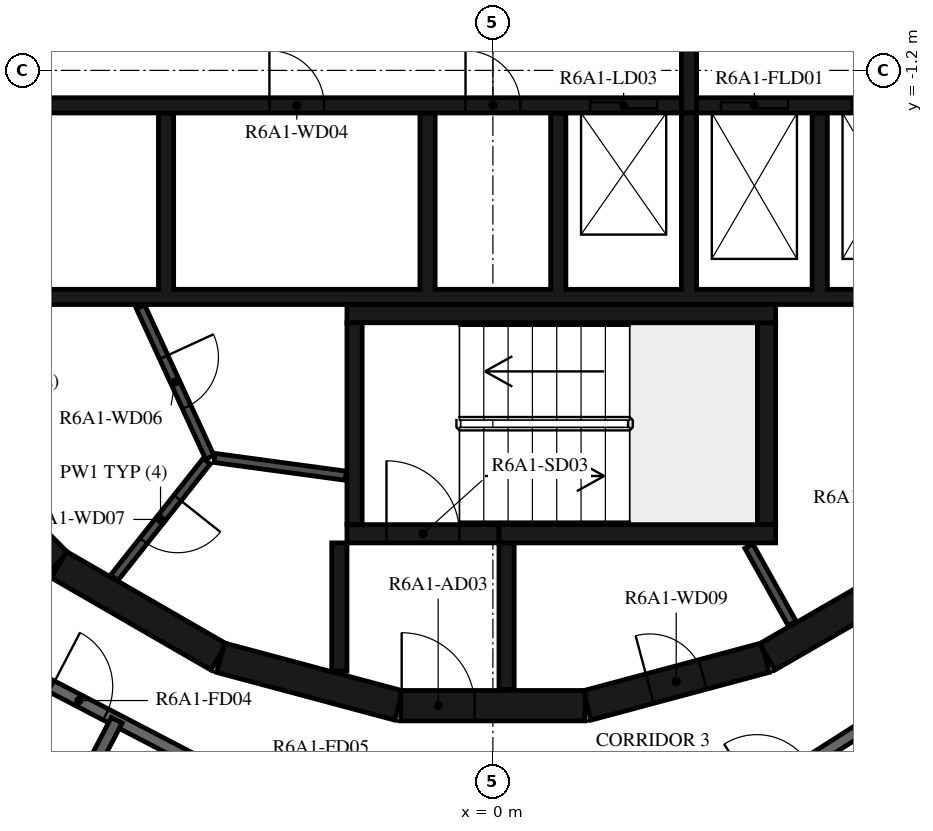
"""IFC4 building model, lengths in metres.
Left out: names, types, materials, properties, quantities, classifications, styles, units other than length and angle.
Written with IfcOpenShell. Run it as: python <this file> out.ifc"""

import sys

from ifc_helpers import new_model, si_unit, direction, frame, frame_2d, origin, place, context, subcontext, project, spatial, polyline, rectangle, outline, extrude, element, fill, save


model = new_model("IFC4")
c1 = context("Model", 3, precision=1e-05, world=origin(), true_north=direction((0.0, 1.0)))
c2 = subcontext(c1, "Body", "Model", "MODEL_VIEW")
j1 = project(units=[si_unit("LENGTHUNIT", "METRE"), si_unit("PLANEANGLEUNIT", "RADIAN")], contexts=[c1])
p1 = place(None, origin())
s1 = spatial("IfcSite", under=j1, at=p1, CompositionType="ELEMENT")
p2 = place(p1, origin())
s2 = spatial("IfcBuilding", under=s1, at=p2, CompositionType="ELEMENT")
p3 = place(p2, frame((0.0, 0.0, 230.2)))
s3 = spatial("IfcBuildingStorey", under=s2, at=p3, CompositionType="ELEMENT", Elevation=230.2)
p4 = place(p3, frame((1.55, -11.643, 0.0), z_axis=(0.0, 0.0, 1.0), x_axis=(0.965948410781, 0.258734743916, 0.0)))
e1 = element("IfcWall", 1, at=p4, inside=s3, PredefinedType="SHEAR", context=c2, shape_type="SweptSolid", body=[
    extrude(rectangle(XDim=3.033, YDim=0.5, at=frame_2d((1.516, 0.0))), origin(), (0.0, 0.0, 1.0), 3.12),
])
p5 = place(p4, frame((1.066, 0.0, 0.0)))
e2 = element("IfcOpeningElement", 2, at=p5, cuts=e1, PredefinedType="OPENING", context=c2, shape_type="SweptSolid", body=[
    extrude(rectangle(XDim=0.9, YDim=2.1, at=frame_2d((0.45, 1.05))), frame((0.0, 0.26, 0.0), z_axis=(0.0, -1.0, 0.0), x_axis=(1.0, 0.0, 0.0)), (0.0, 0.0, 1.0), 0.52),
])
p6 = place(p3, frame((4.51, -10.845, 0.0), z_axis=(0.0, 0.0, 1.0), x_axis=(0.865975092491, 0.500087131594, 0.0)))
e3 = element("IfcWall", 3, at=p6, inside=s3, PredefinedType="SHEAR", context=c2, shape_type="SweptSolid", body=[
    extrude(rectangle(XDim=3.033, YDim=0.5, at=frame_2d((1.516, 0.0))), origin(), (0.0, 0.0, 1.0), 3.12),
])
p7 = place(p3, frame((-9.308, -7.164, 0.0), z_axis=(0.0, 0.0, 1.0), x_axis=(0.707106781187, -0.707106781187, 0.0)))
e4 = element("IfcWall", 4, at=p7, inside=s3, PredefinedType="SHEAR", context=c2, shape_type="SweptSolid", body=[
    extrude(rectangle(XDim=3.032, YDim=0.5, at=frame_2d((1.516, 0.0))), origin(), (0.0, 0.0, 1.0), 3.12),
])
for number, where, z_axis, x_axis in (
    (5, (-7.137, -9.329, 0.0), (0.0, 0.0, 1.0), (0.866, -0.5, 0.0)),
    (6, (-4.479, -10.858, 0.0), (0.0, 0.0, 1.0), (0.966, -0.259, 0.0)),
):
    element("IfcWall", number, at=place(p3, frame(where, z_axis=z_axis, x_axis=x_axis)), inside=s3, PredefinedType="SHEAR", context=c2, shape_type="SweptSolid", body=[
        extrude(rectangle(XDim=3.033, YDim=0.5, at=frame_2d((1.516, 0.0))), origin(), (0.0, 0.0, 1.0), 3.12),
    ])
p8 = place(p3, frame((-1.516, -11.647, 0.0), z_axis=(0.0, 0.0, 1.0), x_axis=(1.0, 0.0, 0.0)))
e7 = element("IfcWall", 7, at=p8, inside=s3, PredefinedType="SHEAR", context=c2, shape_type="SweptSolid", body=[
    extrude(rectangle(XDim=3.033, YDim=0.5, at=frame_2d((1.516, 0.0))), origin(), (0.0, 0.0, 1.0), 3.12),
])
p9 = place(p8, frame((0.016, 0.0, 0.0)))
e8 = element("IfcOpeningElement", 8, at=p9, cuts=e7, PredefinedType="OPENING", context=c2, shape_type="SweptSolid", body=[
    extrude(rectangle(XDim=1.2, YDim=2.1, at=frame_2d((0.6, 1.05))), frame((0.0, 0.26, 0.0), z_axis=(0.0, -1.0, 0.0), x_axis=(1.0, 0.0, 0.0)), (0.0, 0.0, 1.0), 0.52),
])
p10 = place(p3, frame((-2.275, -8.67, 0.0), z_axis=(0.0, 0.0, 1.0), x_axis=(0.0, 1.0, 0.0)))
e9 = element("IfcWall", 9, at=p10, inside=s3, PredefinedType="SHEAR", context=c2, shape_type="SweptSolid", body=[
    extrude(rectangle(XDim=3.32, YDim=0.25, at=frame_2d((1.66, 0.0))), origin(), (0.0, 0.0, 1.0), 3.12),
])
p11 = place(p3, frame((-2.4, -5.2, 0.0), z_axis=(0.0, 0.0, 1.0), x_axis=(1.0, 0.0, 0.0)))
e10 = element("IfcWall", 10, at=p11, inside=s3, PredefinedType="SHEAR", context=c2, shape_type="SweptSolid", body=[
    extrude(rectangle(XDim=7.05, YDim=0.3, at=frame_2d((3.525, 0.0))), origin(), (0.0, 0.0, 1.0), 3.12),
])
p12 = place(p3, frame((4.5, -8.67, 0.0), z_axis=(0.0, 0.0, 1.0), x_axis=(0.0, 1.0, 0.0)))
e11 = element("IfcWall", 11, at=p12, inside=s3, PredefinedType="SHEAR", context=c2, shape_type="SweptSolid", body=[
    extrude(rectangle(XDim=3.32, YDim=0.3, at=frame_2d((1.66, 0.0))), origin(), (0.0, 0.0, 1.0), 3.12),
])
p13 = place(p3, frame((0.1, -8.82, 0.0), z_axis=(0.0, 0.0, 1.0), x_axis=(1.0, 0.0, 0.0)))
e12 = element("IfcWall", 12, at=p13, inside=s3, PredefinedType="SHEAR", context=c2, shape_type="SweptSolid", body=[
    extrude(rectangle(XDim=4.55, YDim=0.3, at=frame_2d((2.275, 0.0))), origin(), (0.0, 0.0, 1.0), 3.12),
])
p14 = place(p3, frame((-2.4, -8.82, 0.0), z_axis=(0.0, 0.0, 1.0), x_axis=(1.0, 0.0, 0.0)))
e13 = element("IfcWall", 13, at=p14, inside=s3, PredefinedType="SHEAR", context=c2, shape_type="SweptSolid", body=[
    extrude(rectangle(XDim=2.5, YDim=0.3, at=frame_2d((1.25, 0.0))), origin(), (0.0, 0.0, 1.0), 3.12),
])
p15 = place(p14, frame((0.65, 0.0, 0.0)))
e14 = element("IfcOpeningElement", 14, at=p15, cuts=e13, PredefinedType="OPENING", context=c2, shape_type="SweptSolid", body=[
    extrude(rectangle(XDim=1.2, YDim=2.1, at=frame_2d((0.6, 1.05))), frame((0.0, 0.16, 0.0), z_axis=(0.0, -1.0, 0.0), x_axis=(1.0, 0.0, 0.0)), (0.0, 0.0, 1.0), 0.32),
])
p16 = place(p3, frame((-2.525, -8.97, 0.0), z_axis=(0.0, 0.0, 1.0), x_axis=(0.0, -1.0, 0.0)))
e15 = element("IfcWall", 15, at=p16, inside=s3, PredefinedType="SHEAR", context=c2, shape_type="SweptSolid", body=[
    extrude(rectangle(XDim=2.11, YDim=0.25, at=frame_2d((1.055, 0.0))), origin(), (0.0, 0.0, 1.0), 3.12),
])
p17 = place(p3, frame((0.225, -8.97, 0.0), z_axis=(0.0, 0.0, 1.0), x_axis=(0.0, -1.0, 0.0)))
e16 = element("IfcWall", 16, at=p17, inside=s3, PredefinedType="SHEAR", context=c2, shape_type="SweptSolid", body=[
    extrude(rectangle(XDim=2.41, YDim=0.25, at=frame_2d((1.205, 0.0))), origin(), (0.0, 0.0, 1.0), 3.12),
])
p18 = place(p3, origin())
e17 = element("IfcWall", 17, at=p18, inside=s3, PredefinedType="SHEAR", context=c2, shape_type="SweptSolid", body=[
    extrude(outline(polyline([(9.8, -5.05), (9.8, -4.8), (9.8, -1.9), (9.55, -1.9), (9.55, -4.8), (7.65, -4.8), (7.65, -1.9), (7.4, -1.9), (7.4, -4.8), (5.5, -4.8), (5.5, -1.9), (5.25, -1.9), (5.25, -4.8), (3.35, -4.8), (3.35, -1.9), (3.1, -1.9), (3.1, -4.8), (1.2, -4.8), (1.2, -1.9), (0.95, -1.9), (0.95, -4.8), (-0.95, -4.8), (-0.95, -1.9), (-1.2, -1.9), (-1.2, -4.8), (-5.25, -4.8), (-5.25, -1.9), (-5.5, -1.9), (-5.5, -4.8), (-7.4, -4.8), (-7.4, -1.9), (-7.65, -1.9), (-7.65, -4.8), (-9.55, -4.8), (-9.55, -1.9), (-9.8, -1.9), (-9.8, -4.8), (-9.8, -5.05), (9.8, -5.05)])), origin(), (0.0, 0.0, 1.0), 3.12),
])
p19 = place(p3, frame((-11.28, -1.775, 0.0), z_axis=(0.0, 0.0, 1.0), x_axis=(1.0, 0.0, 0.0)))
e18 = element("IfcWall", 18, at=p19, inside=s3, PredefinedType="SHEAR", context=c2, shape_type="SweptSolid", body=[
    extrude(rectangle(XDim=14.38, YDim=0.25, at=frame_2d((7.19, 0.0))), origin(), (0.0, 0.0, 1.0), 3.12),
])
p20 = place(p19, frame((12.88, 0.0, 0.0)))
e19 = element("IfcOpeningElement", 19, at=p20, cuts=e18, PredefinedType="OPENING", context=c2, shape_type="SweptSolid", body=[
    extrude(rectangle(XDim=1.1, YDim=2.1, at=frame_2d((0.55, 1.05))), frame((0.0, 0.135, 0.0), z_axis=(0.0, -1.0, 0.0), x_axis=(1.0, 0.0, 0.0)), (0.0, 0.0, 1.0), 0.27),
])
p21 = place(p19, frame((7.605, 0.0, 0.0)))
e20 = element("IfcOpeningElement", 20, at=p21, cuts=e18, PredefinedType="OPENING", context=c2, shape_type="SweptSolid", body=[
    extrude(rectangle(XDim=0.9, YDim=2.1, at=frame_2d((0.45, 1.05))), frame((0.0, 0.135, 0.0), z_axis=(0.0, -1.0, 0.0), x_axis=(1.0, 0.0, 0.0)), (0.0, 0.0, 1.0), 0.27),
])
p22 = place(p19, frame((10.83, 0.0, 0.0)))
e21 = element("IfcOpeningElement", 21, at=p22, cuts=e18, PredefinedType="OPENING", context=c2, shape_type="SweptSolid", body=[
    extrude(rectangle(XDim=0.9, YDim=2.1, at=frame_2d((0.45, 1.05))), frame((0.0, 0.135, 0.0), z_axis=(0.0, -1.0, 0.0), x_axis=(1.0, 0.0, 0.0)), (0.0, 0.0, 1.0), 0.27),
])
p23 = place(p3, frame((3.35, -1.775, 0.0), z_axis=(0.0, 0.0, 1.0), x_axis=(1.0, 0.0, 0.0)))
e22 = element("IfcWall", 22, at=p23, inside=s3, PredefinedType="SHEAR", context=c2, shape_type="SweptSolid", body=[
    extrude(rectangle(XDim=7.93, YDim=0.25, at=frame_2d((3.965, 0.0))), origin(), (0.0, 0.0, 1.0), 3.12),
])
p24 = place(p23, frame((0.4, 0.0, 0.0)))
e23 = element("IfcOpeningElement", 23, at=p24, cuts=e22, PredefinedType="OPENING", context=c2, shape_type="SweptSolid", body=[
    extrude(rectangle(XDim=1.1, YDim=2.4, at=frame_2d((0.55, 1.2))), frame((0.0, 0.135, 0.0), z_axis=(0.0, -1.0, 0.0), x_axis=(1.0, 0.0, 0.0)), (0.0, 0.0, 1.0), 0.27),
])
p25 = place(p23, frame((2.55, 0.0, 0.0)))
e24 = element("IfcOpeningElement", 24, at=p25, cuts=e22, PredefinedType="OPENING", context=c2, shape_type="SweptSolid", body=[
    extrude(rectangle(XDim=1.1, YDim=2.4, at=frame_2d((0.55, 1.2))), frame((0.0, 0.135, 0.0), z_axis=(0.0, -1.0, 0.0), x_axis=(1.0, 0.0, 0.0)), (0.0, 0.0, 1.0), 0.27),
])
p26 = place(p23, frame((4.7, 0.0, 0.0)))
e25 = element("IfcOpeningElement", 25, at=p26, cuts=e22, PredefinedType="OPENING", context=c2, shape_type="SweptSolid", body=[
    extrude(rectangle(XDim=1.1, YDim=2.4, at=frame_2d((0.55, 1.2))), frame((0.0, 0.135, 0.0), z_axis=(0.0, -1.0, 0.0), x_axis=(1.0, 0.0, 0.0)), (0.0, 0.0, 1.0), 0.27),
])
p27 = place(p3, frame((3.225, -1.9, 0.0), z_axis=(0.0, 0.0, 1.0), x_axis=(0.0, 1.0, 0.0)))
e26 = element("IfcWall", 26, at=p27, inside=s3, PredefinedType="SHEAR", context=c2, shape_type="SweptSolid", body=[
    extrude(rectangle(XDim=3.8, YDim=0.25, at=frame_2d((1.9, 0.0))), origin(), (0.0, 0.0, 1.0), 3.12),
])
p28 = place(p3, frame((4.922, -10.296, 0.0), z_axis=(0.0, 0.0, 1.0), x_axis=(-0.48860846254, 0.872503163509, 0.0)))
e27 = element("IfcWall", 27, at=p28, inside=s3, PredefinedType="PARTITIONING", context=c2, shape_type="SweptSolid", body=[
    extrude(rectangle(XDim=1.459, YDim=0.15, at=frame_2d((0.73, 0.0))), origin(), (0.0, 0.0, 1.0), 3.12),
])
p29 = place(p3, frame((-5.795, -5.086, 0.0), z_axis=(0.0, 0.0, 1.0), x_axis=(0.417887867606, -0.908498613157, 0.0)))
e28 = element("IfcWall", 28, at=p29, inside=s3, PredefinedType="PARTITIONING", context=c2, shape_type="SweptSolid", body=[
    extrude(rectangle(XDim=2.726, YDim=0.15, at=frame_2d((1.363, 0.0))), origin(), (0.0, 0.0, 1.0), 3.12),
])
p30 = place(p29, frame((0.913, 0.0, 0.0)))
e29 = element("IfcOpeningElement", 29, at=p30, cuts=e28, PredefinedType="OPENING", context=c2, shape_type="SweptSolid", body=[
    extrude(rectangle(XDim=0.9, YDim=2.1, at=frame_2d((0.45, 1.05))), frame((0.0, 0.085, 0.0), z_axis=(0.0, -1.0, 0.0), x_axis=(1.0, 0.0, 0.0)), (0.0, 0.0, 1.0), 0.17),
])
p31 = place(p3, frame((-4.706, -7.625, 0.0), z_axis=(0.0, 0.0, 1.0), x_axis=(-0.621392599334, -0.783499353856, 0.0)))
e30 = element("IfcWall", 30, at=p31, inside=s3, PredefinedType="PARTITIONING", context=c2, shape_type="SweptSolid", body=[
    extrude(rectangle(XDim=2.447, YDim=0.15, at=frame_2d((1.224, 0.0))), origin(), (0.0, 0.0, 1.0), 3.12),
])
p32 = place(p31, frame((0.774, 0.0, 0.0)))
e31 = element("IfcOpeningElement", 31, at=p32, cuts=e30, PredefinedType="OPENING", context=c2, shape_type="SweptSolid", body=[
    extrude(rectangle(XDim=0.9, YDim=2.1, at=frame_2d((0.45, 1.05))), frame((0.0, 0.085, 0.0), z_axis=(0.0, -1.0, 0.0), x_axis=(1.0, 0.0, 0.0)), (0.0, 0.0, 1.0), 0.17),
])
p33 = place(p3, frame((-2.42, -7.865, 0.0), z_axis=(0.0, 0.0, 1.0), x_axis=(-0.990972299108, 0.134066783362, 0.0)))
e32 = element("IfcWall", 32, at=p33, inside=s3, PredefinedType="PARTITIONING", context=c2, shape_type="SweptSolid", body=[
    extrude(rectangle(XDim=2.176, YDim=0.15, at=frame_2d((1.088, 0.0))), origin(), (0.0, 0.0, 1.0), 3.12),
])
p34 = place(p3, frame((-9.372, -10.228, 0.0), z_axis=(0.0, 0.0, 1.0), x_axis=(0.887005184532, -0.461759464021, 0.0)))
e33 = element("IfcWall", 33, at=p34, inside=s3, PredefinedType="STANDARD", context=c2, shape_type="SweptSolid", body=[
    extrude(rectangle(XDim=7.181, YDim=0.2, at=frame_2d((3.591, 0.0))), origin(), (0.0, 0.0, 1.0), 3.12),
])
p35 = place(p34, frame((2.391, 0.0, 0.0)))
e34 = element("IfcOpeningElement", 34, at=p35, cuts=e33, PredefinedType="OPENING", context=c2, shape_type="SweptSolid", body=[
    extrude(rectangle(XDim=1.0, YDim=2.1, at=frame_2d((0.5, 1.05))), frame((0.0, 0.11, 0.0), z_axis=(0.0, -1.0, 0.0), x_axis=(1.0, 0.0, 0.0)), (0.0, 0.0, 1.0), 0.22),
])
p36 = place(p3, frame((4.172, -13.231, 0.0), z_axis=(0.0, 0.0, 1.0), x_axis=(0.843388394728, 0.537304397561, 0.0)))
e35 = element("IfcWall", 35, at=p36, inside=s3, PredefinedType="STANDARD", context=c2, shape_type="SweptSolid", body=[
    extrude(rectangle(XDim=7.181, YDim=0.2, at=frame_2d((3.59, 0.0))), origin(), (0.0, 0.0, 1.0), 3.12),
])
p37 = place(p36, frame((0.2, 0.0, 0.0)))
e36 = element("IfcOpeningElement", 36, at=p37, cuts=e35, PredefinedType="OPENING", context=c2, shape_type="SweptSolid", body=[
    extrude(rectangle(XDim=1.0, YDim=2.1, at=frame_2d((0.5, 1.05))), frame((0.0, 0.11, 0.0), z_axis=(0.0, -1.0, 0.0), x_axis=(1.0, 0.0, 0.0)), (0.0, 0.0, 1.0), 0.22),
])
p38 = place(p3, frame((-8.326, -15.996, 0.0), z_axis=(0.0, 0.0, 1.0), x_axis=(0.461739255077, 0.887015704664, 0.0)))
e37 = element("IfcWall", 37, at=p38, inside=s3, PredefinedType="STANDARD", context=c2, shape_type="SweptSolid", body=[
    extrude(rectangle(XDim=4.633, YDim=0.2, at=frame_2d((2.317, 0.0))), origin(), (0.0, 0.0, 1.0), 3.12),
])
p39 = place(p3, frame((-10.421, -11.373, 0.0), z_axis=(0.0, 0.0, 1.0), x_axis=(0.887006451745, -0.461757029792, 0.0)))
e38 = element("IfcWall", 38, at=p39, inside=s3, PredefinedType="PARTITIONING", context=c2, shape_type="SweptSolid", body=[
    extrude(rectangle(XDim=3.992, YDim=0.12, at=frame_2d((1.996, 0.0))), origin(), (0.0, 0.0, 1.0), 3.12),
])
p40 = place(p39, frame((0.639, 0.0, 0.0)))
e39 = element("IfcOpeningElement", 39, at=p40, cuts=e38, PredefinedType="OPENING", context=c2, shape_type="SweptSolid", body=[
    extrude(rectangle(XDim=0.9, YDim=2.1, at=frame_2d((0.45, 1.05))), frame((0.0, 0.07, 0.0), z_axis=(0.0, -1.0, 0.0), x_axis=(1.0, 0.0, 0.0)), (0.0, 0.0, 1.0), 0.14),
])
p41 = place(p3, frame((4.83, -14.59, 0.0), z_axis=(0.0, 0.0, 1.0), x_axis=(0.843393042763, 0.537297101629, 0.0)))
e40 = element("IfcWall", 40, at=p41, inside=s3, PredefinedType="PARTITIONING", context=c2, shape_type="SweptSolid", body=[
    extrude(rectangle(XDim=7.53, YDim=0.12, at=frame_2d((3.765, 0.0))), origin(), (0.0, 0.0, 1.0), 3.12),
])
p42 = place(p41, frame((0.2, 0.0, 0.0)))
e41 = element("IfcOpeningElement", 41, at=p42, cuts=e40, PredefinedType="OPENING", context=c2, shape_type="SweptSolid", body=[
    extrude(rectangle(XDim=0.9, YDim=2.1, at=frame_2d((0.45, 1.05))), frame((0.0, 0.07, 0.0), z_axis=(0.0, -1.0, 0.0), x_axis=(1.0, 0.0, 0.0)), (0.0, 0.0, 1.0), 0.14),
])
p43 = place(p15, origin())
e42 = element("IfcDoor", 42, at=p43, inside=s3, OperationType="SINGLE_SWING_LEFT", PredefinedType="DOOR", context=c2, shape_type="SweptSolid", body=[
    extrude(rectangle(XDim=1.2, YDim=2.1, at=frame_2d((0.6, 1.05))), frame((0.0, 0.025, 0.0), z_axis=(0.0, -1.0, 0.0), x_axis=(1.0, 0.0, 0.0)), (0.0, 0.0, 1.0), 0.05),
])
fill(e14, e42)
p44 = place(p9, origin())
e43 = element("IfcDoor", 43, at=p44, inside=s3, OperationType="SINGLE_SWING_RIGHT", PredefinedType="DOOR", context=c2, shape_type="SweptSolid", body=[
    extrude(rectangle(XDim=1.2, YDim=2.1, at=frame_2d((0.6, 1.05))), frame((0.0, 0.025, 0.0), z_axis=(0.0, -1.0, 0.0), x_axis=(1.0, 0.0, 0.0)), (0.0, 0.0, 1.0), 0.05),
])
fill(e8, e43)
p45 = place(p20, origin())
e44 = element("IfcDoor", 44, at=p45, inside=s3, OperationType="DOUBLE_DOOR_SLIDING", PredefinedType="DOOR", context=c2, shape_type="SweptSolid", body=[
    extrude(rectangle(XDim=1.1, YDim=2.1, at=frame_2d((0.55, 1.05))), frame((0.0, 0.025, 0.0), z_axis=(0.0, -1.0, 0.0), x_axis=(1.0, 0.0, 0.0)), (0.0, 0.0, 1.0), 0.05),
])
fill(e19, e44)
p46 = place(p24, origin())
e45 = element("IfcDoor", 45, at=p46, inside=s3, OperationType="DOUBLE_DOOR_SLIDING", PredefinedType="DOOR", context=c2, shape_type="SweptSolid", body=[
    extrude(rectangle(XDim=1.1, YDim=2.4, at=frame_2d((0.55, 1.2))), frame((0.0, 0.025, 0.0), z_axis=(0.0, -1.0, 0.0), x_axis=(1.0, 0.0, 0.0)), (0.0, 0.0, 1.0), 0.05),
])
fill(e23, e45)
p47 = place(p25, origin())
e46 = element("IfcDoor", 46, at=p47, inside=s3, OperationType="DOUBLE_DOOR_SLIDING", PredefinedType="DOOR", context=c2, shape_type="SweptSolid", body=[
    extrude(rectangle(XDim=1.1, YDim=2.4, at=frame_2d((0.55, 1.2))), frame((0.0, 0.025, 0.0), z_axis=(0.0, -1.0, 0.0), x_axis=(1.0, 0.0, 0.0)), (0.0, 0.0, 1.0), 0.05),
])
fill(e24, e46)
p48 = place(p21, origin())
e47 = element("IfcDoor", 47, at=p48, inside=s3, OperationType="SINGLE_SWING_RIGHT", PredefinedType="DOOR", context=c2, shape_type="SweptSolid", body=[
    extrude(rectangle(XDim=0.9, YDim=2.1, at=frame_2d((0.45, 1.05))), frame((0.0, 0.025, 0.0), z_axis=(0.0, -1.0, 0.0), x_axis=(1.0, 0.0, 0.0)), (0.0, 0.0, 1.0), 0.05),
])
fill(e20, e47)
p49 = place(p22, origin())
e48 = element("IfcDoor", 48, at=p49, inside=s3, OperationType="SINGLE_SWING_LEFT", PredefinedType="DOOR", context=c2, shape_type="SweptSolid", body=[
    extrude(rectangle(XDim=0.9, YDim=2.1, at=frame_2d((0.45, 1.05))), frame((0.0, 0.025, 0.0), z_axis=(0.0, -1.0, 0.0), x_axis=(1.0, 0.0, 0.0)), (0.0, 0.0, 1.0), 0.05),
])
fill(e21, e48)
p50 = place(p30, origin())
e49 = element("IfcDoor", 49, at=p50, inside=s3, OperationType="SINGLE_SWING_RIGHT", PredefinedType="DOOR", context=c2, shape_type="SweptSolid", body=[
    extrude(rectangle(XDim=0.9, YDim=2.1, at=frame_2d((0.45, 1.05))), frame((0.0, 0.025, 0.0), z_axis=(0.0, -1.0, 0.0), x_axis=(1.0, 0.0, 0.0)), (0.0, 0.0, 1.0), 0.05),
])
fill(e29, e49)
p51 = place(p32, origin())
e50 = element("IfcDoor", 50, at=p51, inside=s3, OperationType="SINGLE_SWING_LEFT", PredefinedType="DOOR", context=c2, shape_type="SweptSolid", body=[
    extrude(rectangle(XDim=0.9, YDim=2.1, at=frame_2d((0.45, 1.05))), frame((0.0, 0.025, 0.0), z_axis=(0.0, -1.0, 0.0), x_axis=(1.0, 0.0, 0.0)), (0.0, 0.0, 1.0), 0.05),
])
fill(e31, e50)
p52 = place(p5, origin())
e51 = element("IfcDoor", 51, at=p52, inside=s3, OperationType="SINGLE_SWING_LEFT", PredefinedType="DOOR", context=c2, shape_type="SweptSolid", body=[
    extrude(rectangle(XDim=0.9, YDim=2.1, at=frame_2d((0.45, 1.05))), frame((0.0, 0.025, 0.0), z_axis=(0.0, -1.0, 0.0), x_axis=(1.0, 0.0, 0.0)), (0.0, 0.0, 1.0), 0.05),
])
fill(e2, e51)
p53 = place(p35, origin())
e52 = element("IfcDoor", 52, at=p53, inside=s3, OperationType="SINGLE_SWING_RIGHT", PredefinedType="DOOR", context=c2, shape_type="SweptSolid", body=[
    extrude(rectangle(XDim=1.0, YDim=2.1, at=frame_2d((0.5, 1.05))), frame((0.0, 0.025, 0.0), z_axis=(0.0, -1.0, 0.0), x_axis=(1.0, 0.0, 0.0)), (0.0, 0.0, 1.0), 0.05),
])
fill(e34, e52)
save(model, sys.argv[1])
